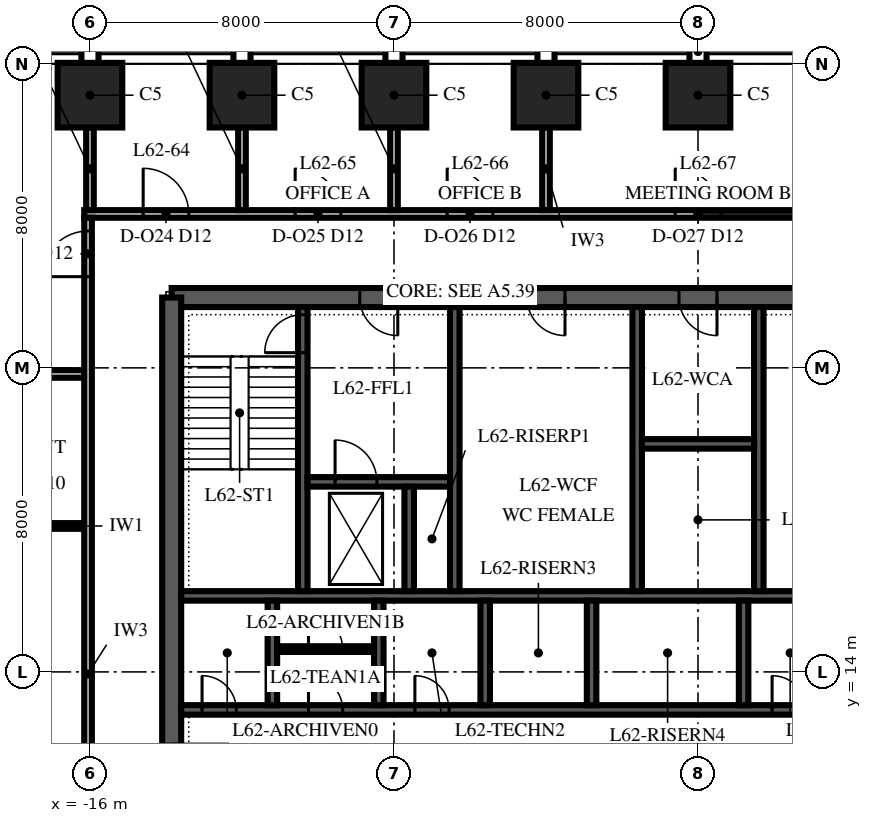
"""IFC4 building model, lengths in metres.
Left out: names, types, materials, properties, quantities, classifications, styles, units other than length and angle.
Written with IfcOpenShell. Run it as: python <this file> out.ifc"""

import sys

from ifc_helpers import new_model, si_unit, direction, frame, frame_2d, origin, origin_2d, place, context, subcontext, project, spatial, polyline, rectangle, outline, extrude, element, fill, save


model = new_model("IFC4")
c1 = context("Model", 3, precision=1e-05, world=origin(), true_north=direction((0.0, 1.0)))
c2 = subcontext(c1, "Body", "Model", "MODEL_VIEW")
j1 = project(units=[si_unit("LENGTHUNIT", "METRE"), si_unit("PLANEANGLEUNIT", "RADIAN")], contexts=[c1])
p1 = place(None, origin())
s1 = spatial("IfcSite", under=j1, at=p1, CompositionType="ELEMENT")
p2 = place(p1, origin())
s2 = spatial("IfcBuilding", under=s1, at=p2, CompositionType="ELEMENT")
p3 = place(p2, frame((0.0, 0.0, 268.0)))
s3 = spatial("IfcBuildingStorey", under=s2, at=p3, CompositionType="ELEMENT", Elevation=268.0)
for number, where, z_axis, x_axis in (
    (1, (0.0, 29.175, 0.0), (0.0, 0.0, 1.0), (-1.0, 0.0, 0.0)),
    (2, (-4.0, 29.175, 0.0), (0.0, 0.0, 1.0), (-1.0, 0.0, 0.0)),
    (3, (-8.0, 29.175, 0.0), (0.0, 0.0, 1.0), (-1.0, 0.0, 0.0)),
    (4, (-12.0, 29.175, 0.0), (0.0, 0.0, 1.0), (-1.0, 0.0, 0.0)),
    (5, (-16.0, 29.175, 0.0), (0.0, 0.0, 1.0), (-1.0, 0.0, 0.0)),
):
    element("IfcColumn", number, at=place(p3, frame(where, z_axis=z_axis, x_axis=x_axis)), inside=s3, PredefinedType="COLUMN", context=c2, shape_type="SweptSolid", body=[
        extrude(rectangle(XDim=1.7, YDim=1.7, at=origin_2d()), origin(), (0.0, 0.0, 1.0), 4.0),
    ])
p4 = place(p3, frame((13.85, 23.85, 0.0), z_axis=(0.0, 0.0, 1.0), x_axis=(-1.0, 0.0, 0.0)))
e6 = element("IfcWall", 6, at=p4, inside=s3, PredefinedType="SHEAR", context=c2, shape_type="SweptSolid", body=[
    extrude(rectangle(XDim=27.7, YDim=0.5, at=frame_2d((13.85, 0.0))), origin(), (0.0, 0.0, 1.0), 4.0),
])
p5 = place(p4, frame((21.75, 0.0, 0.0)))
e7 = element("IfcOpeningElement", 7, at=p5, cuts=e6, PredefinedType="OPENING", context=c2, shape_type="SweptSolid", body=[
    extrude(rectangle(XDim=1.0, YDim=2.1, at=frame_2d((0.5, 1.05))), frame((0.0, 0.265, 0.0), z_axis=(0.0, -1.0, 0.0), x_axis=(1.0, 0.0, 0.0)), (0.0, 0.0, 1.0), 0.53),
])
p6 = place(p4, frame((4.95, 0.0, 0.0)))
e8 = element("IfcOpeningElement", 8, at=p6, cuts=e6, PredefinedType="OPENING", context=c2, shape_type="SweptSolid", body=[
    extrude(rectangle(XDim=1.0, YDim=2.1, at=frame_2d((0.5, 1.05))), frame((0.0, 0.265, 0.0), z_axis=(0.0, -1.0, 0.0), x_axis=(1.0, 0.0, 0.0)), (0.0, 0.0, 1.0), 0.53),
])
p7 = place(p4, frame((17.35, 0.0, 0.0)))
e9 = element("IfcOpeningElement", 9, at=p7, cuts=e6, PredefinedType="OPENING", context=c2, shape_type="SweptSolid", body=[
    extrude(rectangle(XDim=1.0, YDim=2.1, at=frame_2d((0.5, 1.05))), frame((0.0, 0.265, 0.0), z_axis=(0.0, -1.0, 0.0), x_axis=(1.0, 0.0, 0.0)), (0.0, 0.0, 1.0), 0.53),
])
p8 = place(p4, frame((13.35, 0.0, 0.0)))
e10 = element("IfcOpeningElement", 10, at=p8, cuts=e6, PredefinedType="OPENING", context=c2, shape_type="SweptSolid", body=[
    extrude(rectangle(XDim=1.0, YDim=2.1, at=frame_2d((0.5, 1.05))), frame((0.0, 0.265, 0.0), z_axis=(0.0, -1.0, 0.0), x_axis=(1.0, 0.0, 0.0)), (0.0, 0.0, 1.0), 0.53),
])
p9 = place(p4, frame((9.35, 0.0, 0.0)))
e11 = element("IfcOpeningElement", 11, at=p9, cuts=e6, PredefinedType="OPENING", context=c2, shape_type="SweptSolid", body=[
    extrude(rectangle(XDim=1.0, YDim=2.1, at=frame_2d((0.5, 1.05))), frame((0.0, 0.265, 0.0), z_axis=(0.0, -1.0, 0.0), x_axis=(1.0, 0.0, 0.0)), (0.0, 0.0, 1.0), 0.53),
])
p10 = place(p3, frame((-13.85, 23.85, 0.0), z_axis=(0.0, 0.0, 1.0), x_axis=(0.0, -1.0, 0.0)))
e12 = element("IfcWall", 12, at=p10, inside=s3, PredefinedType="SHEAR", context=c2, shape_type="SweptSolid", body=[
    extrude(outline(polyline([(0.0, -0.25), (17.7, -0.25), (17.7, 0.0), (17.45, 0.0), (17.45, 0.25), (0.25, 0.25), (0.25, 0.0), (0.0, 0.0), (0.0, -0.25)])), origin(), (0.0, 0.0, 1.0), 4.0),
])
p11 = place(p10, frame((11.75, 0.0, 0.0)))
e13 = element("IfcOpeningElement", 13, at=p11, cuts=e12, PredefinedType="OPENING", context=c2, shape_type="SweptSolid", body=[
    extrude(rectangle(XDim=1.8, YDim=2.4, at=frame_2d((0.9, 1.2))), frame((0.0, 0.265, 0.0), z_axis=(0.0, -1.0, 0.0), x_axis=(1.0, 0.0, 0.0)), (0.0, 0.0, 1.0), 0.53),
])
p12 = place(p3, frame((-13.6, 13.0, 0.0), z_axis=(0.0, 0.0, 1.0), x_axis=(1.0, 0.0, 0.0)))
e14 = element("IfcWall", 14, at=p12, inside=s3, PredefinedType="SHEAR", context=c2, shape_type="SweptSolid", body=[
    extrude(rectangle(XDim=27.2, YDim=0.25, at=frame_2d((13.6, 0.0))), origin(), (0.0, 0.0, 1.0), 4.0),
])
p13 = place(p12, frame((15.55, 0.0, 0.0)))
e15 = element("IfcOpeningElement", 15, at=p13, cuts=e14, PredefinedType="OPENING", context=c2, shape_type="SweptSolid", body=[
    extrude(rectangle(XDim=0.9, YDim=2.1, at=frame_2d((0.45, 1.05))), frame((0.0, 0.14, 0.0), z_axis=(0.0, -1.0, 0.0), x_axis=(1.0, 0.0, 0.0)), (0.0, 0.0, 1.0), 0.28),
])
p14 = place(p12, frame((17.95, 0.0, 0.0)))
e16 = element("IfcOpeningElement", 16, at=p14, cuts=e14, PredefinedType="OPENING", context=c2, shape_type="SweptSolid", body=[
    extrude(rectangle(XDim=0.9, YDim=2.1, at=frame_2d((0.45, 1.05))), frame((0.0, 0.14, 0.0), z_axis=(0.0, -1.0, 0.0), x_axis=(1.0, 0.0, 0.0)), (0.0, 0.0, 1.0), 0.28),
])
p15 = place(p12, frame((21.15, 0.0, 0.0)))
e17 = element("IfcOpeningElement", 17, at=p15, cuts=e14, PredefinedType="OPENING", context=c2, shape_type="SweptSolid", body=[
    extrude(rectangle(XDim=0.9, YDim=2.1, at=frame_2d((0.45, 1.05))), frame((0.0, 0.14, 0.0), z_axis=(0.0, -1.0, 0.0), x_axis=(1.0, 0.0, 0.0)), (0.0, 0.0, 1.0), 0.28),
])
p16 = place(p12, frame((0.55, 0.0, 0.0)))
e18 = element("IfcOpeningElement", 18, at=p16, cuts=e14, PredefinedType="OPENING", context=c2, shape_type="SweptSolid", body=[
    extrude(rectangle(XDim=0.9, YDim=2.1, at=frame_2d((0.45, 1.05))), frame((0.0, 0.14, 0.0), z_axis=(0.0, -1.0, 0.0), x_axis=(1.0, 0.0, 0.0)), (0.0, 0.0, 1.0), 0.28),
])
p17 = place(p12, frame((3.35, 0.0, 0.0)))
e19 = element("IfcOpeningElement", 19, at=p17, cuts=e14, PredefinedType="OPENING", context=c2, shape_type="SweptSolid", body=[
    extrude(rectangle(XDim=0.9, YDim=2.1, at=frame_2d((0.45, 1.05))), frame((0.0, 0.14, 0.0), z_axis=(0.0, -1.0, 0.0), x_axis=(1.0, 0.0, 0.0)), (0.0, 0.0, 1.0), 0.28),
])
p18 = place(p12, frame((6.15, 0.0, 0.0)))
e20 = element("IfcOpeningElement", 20, at=p18, cuts=e14, PredefinedType="OPENING", context=c2, shape_type="SweptSolid", body=[
    extrude(rectangle(XDim=0.9, YDim=2.1, at=frame_2d((0.45, 1.05))), frame((0.0, 0.14, 0.0), z_axis=(0.0, -1.0, 0.0), x_axis=(1.0, 0.0, 0.0)), (0.0, 0.0, 1.0), 0.28),
])
p19 = place(p3, frame((-13.6, 16.0, 0.0), z_axis=(0.0, 0.0, 1.0), x_axis=(1.0, 0.0, 0.0)))
e21 = element("IfcWall", 21, at=p19, inside=s3, PredefinedType="SHEAR", context=c2, shape_type="SweptSolid", body=[
    extrude(rectangle(XDim=27.2, YDim=0.25, at=frame_2d((13.6, 0.0))), origin(), (0.0, 0.0, 1.0), 4.0),
])
for number, where, z_axis, x_axis in (
    (22, (-11.2, 13.125, 0.0), (0.0, 0.0, 1.0), (0.0, 1.0, 0.0)),
    (23, (-8.4, 13.125, 0.0), (0.0, 0.0, 1.0), (0.0, 1.0, 0.0)),
    (24, (-5.6, 13.125, 0.0), (0.0, 0.0, 1.0), (0.0, 1.0, 0.0)),
    (25, (-2.8, 13.125, 0.0), (0.0, 0.0, 1.0), (0.0, 1.0, 0.0)),
    (26, (1.2, 13.125, 0.0), (0.0, 0.0, 1.0), (0.0, 1.0, 0.0)),
):
    element("IfcWall", number, at=place(p3, frame(where, z_axis=z_axis, x_axis=x_axis)), inside=s3, PredefinedType="SHEAR", context=c2, shape_type="SweptSolid", body=[
        extrude(rectangle(XDim=2.75, YDim=0.25, at=frame_2d((1.375, 0.0))), origin(), (0.0, 0.0, 1.0), 4.0),
    ])
p20 = place(p3, frame((-10.4, 16.125, 0.0), z_axis=(0.0, 0.0, 1.0), x_axis=(0.0, 1.0, 0.0)))
e27 = element("IfcWall", 27, at=p20, inside=s3, PredefinedType="SHEAR", context=c2, shape_type="SweptSolid", body=[
    extrude(rectangle(XDim=7.475, YDim=0.25, at=frame_2d((3.738, 0.0))), origin(), (0.0, 0.0, 1.0), 4.0),
])
p21 = place(p20, frame((6.275, 0.0, 0.0)))
e28 = element("IfcOpeningElement", 28, at=p21, cuts=e27, PredefinedType="OPENING", context=c2, shape_type="SweptSolid", body=[
    extrude(rectangle(XDim=1.0, YDim=2.1, at=frame_2d((0.5, 1.05))), frame((0.0, 0.14, 0.0), z_axis=(0.0, -1.0, 0.0), x_axis=(1.0, 0.0, 0.0)), (0.0, 0.0, 1.0), 0.28),
])
for number, where, z_axis, x_axis in (
    (29, (-6.4, 16.125, 0.0), (0.0, 0.0, 1.0), (0.0, 1.0, 0.0)),
    (30, (-1.6, 16.125, 0.0), (0.0, 0.0, 1.0), (0.0, 1.0, 0.0)),
    (31, (1.6, 16.125, 0.0), (0.0, 0.0, 1.0), (0.0, 1.0, 0.0)),
):
    element("IfcWall", number, at=place(p3, frame(where, z_axis=z_axis, x_axis=x_axis)), inside=s3, PredefinedType="SHEAR", context=c2, shape_type="SweptSolid", body=[
        extrude(rectangle(XDim=7.475, YDim=0.25, at=frame_2d((3.738, 0.0))), origin(), (0.0, 0.0, 1.0), 4.0),
    ])
p22 = place(p3, frame((-10.275, 19.0, 0.0), z_axis=(0.0, 0.0, 1.0), x_axis=(1.0, 0.0, 0.0)))
e32 = element("IfcWall", 32, at=p22, inside=s3, PredefinedType="SHEAR", context=c2, shape_type="SweptSolid", body=[
    extrude(rectangle(XDim=3.75, YDim=0.25, at=frame_2d((1.875, 0.0))), origin(), (0.0, 0.0, 1.0), 4.0),
])
p23 = place(p22, frame((0.725, 0.0, 0.0)))
e33 = element("IfcOpeningElement", 33, at=p23, cuts=e32, PredefinedType="OPENING", context=c2, shape_type="SweptSolid", body=[
    extrude(rectangle(XDim=1.1, YDim=2.1, at=frame_2d((0.55, 1.05))), frame((0.0, 0.14, 0.0), z_axis=(0.0, -1.0, 0.0), x_axis=(1.0, 0.0, 0.0)), (0.0, 0.0, 1.0), 0.28),
])
p24 = place(p3, frame((-7.6, 16.125, 0.0), z_axis=(0.0, 0.0, 1.0), x_axis=(0.0, 1.0, 0.0)))
e34 = element("IfcWall", 34, at=p24, inside=s3, PredefinedType="SHEAR", context=c2, shape_type="SweptSolid", body=[
    extrude(rectangle(XDim=2.75, YDim=0.25, at=frame_2d((1.375, 0.0))), origin(), (0.0, 0.0, 1.0), 4.0),
])
p25 = place(p3, frame((-1.475, 20.0, 0.0), z_axis=(0.0, 0.0, 1.0), x_axis=(1.0, 0.0, 0.0)))
e35 = element("IfcWall", 35, at=p25, inside=s3, PredefinedType="SHEAR", context=c2, shape_type="SweptSolid", body=[
    extrude(rectangle(XDim=2.95, YDim=0.25, at=frame_2d((1.475, 0.0))), origin(), (0.0, 0.0, 1.0), 4.0),
])
p26 = place(p3, frame((-11.075, 14.6, 0.0), z_axis=(0.0, 0.0, 1.0), x_axis=(1.0, 0.0, 0.0)))
e36 = element("IfcWall", 36, at=p26, inside=s3, PredefinedType="PARTITIONING", context=c2, shape_type="SweptSolid", body=[
    extrude(rectangle(XDim=2.55, YDim=0.15, at=frame_2d((1.275, 0.0))), origin(), (0.0, 0.0, 1.0), 3.85),
])
p27 = place(p26, frame((0.825, 0.0, 0.0)))
e37 = element("IfcOpeningElement", 37, at=p27, cuts=e36, PredefinedType="OPENING", context=c2, shape_type="SweptSolid", body=[
    extrude(rectangle(XDim=0.9, YDim=2.1, at=frame_2d((0.45, 1.05))), frame((0.0, 0.09, 0.0), z_axis=(0.0, -1.0, 0.0), x_axis=(1.0, 0.0, 0.0)), (0.0, 0.0, 1.0), 0.18),
])
p28 = place(p3, frame((-19.725, 17.84, 0.0), z_axis=(0.0, 0.0, 1.0), x_axis=(1.0, 0.0, 0.0)))
e38 = element("IfcWall", 38, at=p28, inside=s3, PredefinedType="PARTITIONING", context=c2, shape_type="SweptSolid", body=[
    extrude(rectangle(XDim=3.575, YDim=0.15, at=frame_2d((1.788, 0.0))), origin(), (0.0, 0.0, 1.0), 3.23),
])
p29 = place(p28, frame((1.375, 0.0, 0.0)))
e39 = element("IfcOpeningElement", 39, at=p29, cuts=e38, PredefinedType="OPENING", context=c2, shape_type="SweptSolid", body=[
    extrude(rectangle(XDim=1.0, YDim=2.3, at=frame_2d((0.5, 1.15))), frame((0.0, 0.09, 0.0), z_axis=(0.0, -1.0, 0.0), x_axis=(1.0, 0.0, 0.0)), (0.0, 0.0, 1.0), 0.18),
])
p30 = place(p3, frame((-23.324, 21.84, 0.0), z_axis=(0.0, 0.0, 1.0), x_axis=(1.0, 0.0, 0.0)))
e40 = element("IfcWall", 40, at=p30, inside=s3, PredefinedType="PARTITIONING", context=c2, shape_type="SweptSolid", body=[
    extrude(rectangle(XDim=7.174, YDim=0.2, at=frame_2d((3.587, 0.0))), origin(), (0.0, 0.0, 1.0), 3.23),
])
p31 = place(p3, frame((-16.15, 26.05, 0.0), z_axis=(0.0, 0.0, 1.0), x_axis=(1.0, 0.0, 0.0)))
e41 = element("IfcWall", 41, at=p31, inside=s3, PredefinedType="PARTITIONING", context=c2, shape_type="SweptSolid", body=[
    extrude(rectangle(XDim=32.3, YDim=0.2, at=frame_2d((16.15, 0.0))), origin(), (0.0, 0.0, 1.0), 3.418),
])
p32 = place(p31, frame((1.55, 0.0, 0.0)))
e42 = element("IfcOpeningElement", 42, at=p32, cuts=e41, PredefinedType="OPENING", context=c2, shape_type="SweptSolid", body=[
    extrude(rectangle(XDim=1.2, YDim=2.4, at=frame_2d((0.6, 1.2))), frame((0.0, 0.115, 0.0), z_axis=(0.0, -1.0, 0.0), x_axis=(1.0, 0.0, 0.0)), (0.0, 0.0, 1.0), 0.23),
])
p33 = place(p31, frame((5.55, 0.0, 0.0)))
e43 = element("IfcOpeningElement", 43, at=p33, cuts=e41, PredefinedType="OPENING", context=c2, shape_type="SweptSolid", body=[
    extrude(rectangle(XDim=1.2, YDim=2.4, at=frame_2d((0.6, 1.2))), frame((0.0, 0.115, 0.0), z_axis=(0.0, -1.0, 0.0), x_axis=(1.0, 0.0, 0.0)), (0.0, 0.0, 1.0), 0.23),
])
p34 = place(p31, frame((9.55, 0.0, 0.0)))
e44 = element("IfcOpeningElement", 44, at=p34, cuts=e41, PredefinedType="OPENING", context=c2, shape_type="SweptSolid", body=[
    extrude(rectangle(XDim=1.2, YDim=2.4, at=frame_2d((0.6, 1.2))), frame((0.0, 0.115, 0.0), z_axis=(0.0, -1.0, 0.0), x_axis=(1.0, 0.0, 0.0)), (0.0, 0.0, 1.0), 0.23),
])
p35 = place(p31, frame((15.55, 0.0, 0.0)))
e45 = element("IfcOpeningElement", 45, at=p35, cuts=e41, PredefinedType="OPENING", context=c2, shape_type="SweptSolid", body=[
    extrude(rectangle(XDim=1.2, YDim=2.4, at=frame_2d((0.6, 1.2))), frame((0.0, 0.115, 0.0), z_axis=(0.0, -1.0, 0.0), x_axis=(1.0, 0.0, 0.0)), (0.0, 0.0, 1.0), 0.23),
])
p36 = place(p31, frame((21.55, 0.0, 0.0)))
e46 = element("IfcOpeningElement", 46, at=p36, cuts=e41, PredefinedType="OPENING", context=c2, shape_type="SweptSolid", body=[
    extrude(rectangle(XDim=1.2, YDim=2.4, at=frame_2d((0.6, 1.2))), frame((0.0, 0.115, 0.0), z_axis=(0.0, -1.0, 0.0), x_axis=(1.0, 0.0, 0.0)), (0.0, 0.0, 1.0), 0.23),
])
p37 = place(p31, frame((25.55, 0.0, 0.0)))
e47 = element("IfcOpeningElement", 47, at=p37, cuts=e41, PredefinedType="OPENING", context=c2, shape_type="SweptSolid", body=[
    extrude(rectangle(XDim=1.2, YDim=2.4, at=frame_2d((0.6, 1.2))), frame((0.0, 0.115, 0.0), z_axis=(0.0, -1.0, 0.0), x_axis=(1.0, 0.0, 0.0)), (0.0, 0.0, 1.0), 0.23),
])
p38 = place(p31, frame((29.55, 0.0, 0.0)))
e48 = element("IfcOpeningElement", 48, at=p38, cuts=e41, PredefinedType="OPENING", context=c2, shape_type="SweptSolid", body=[
    extrude(rectangle(XDim=1.2, YDim=2.4, at=frame_2d((0.6, 1.2))), frame((0.0, 0.115, 0.0), z_axis=(0.0, -1.0, 0.0), x_axis=(1.0, 0.0, 0.0)), (0.0, 0.0, 1.0), 0.23),
])
p39 = place(p3, frame((-16.05, 1.94, 0.0), z_axis=(0.0, 0.0, 1.0), x_axis=(0.0, 1.0, 0.0)))
e49 = element("IfcWall", 49, at=p39, inside=s3, PredefinedType="PARTITIONING", context=c2, shape_type="SweptSolid", body=[
    extrude(rectangle(XDim=24.01, YDim=0.2, at=frame_2d((12.005, 0.0))), origin(), (0.0, 0.0, 1.0), 2.842),
])
p40 = place(p39, frame((22.46, 0.0, 0.0)))
e50 = element("IfcOpeningElement", 50, at=p40, cuts=e49, PredefinedType="OPENING", context=c2, shape_type="SweptSolid", body=[
    extrude(rectangle(XDim=1.2, YDim=2.4, at=frame_2d((0.6, 1.2))), frame((0.0, 0.115, 0.0), z_axis=(0.0, -1.0, 0.0), x_axis=(1.0, 0.0, 0.0)), (0.0, 0.0, 1.0), 0.23),
])
p41 = place(p39, frame((6.46, 0.0, 0.0)))
e51 = element("IfcOpeningElement", 51, at=p41, cuts=e49, PredefinedType="OPENING", context=c2, shape_type="SweptSolid", body=[
    extrude(rectangle(XDim=1.2, YDim=2.4, at=frame_2d((0.6, 1.2))), frame((0.0, 0.115, 0.0), z_axis=(0.0, -1.0, 0.0), x_axis=(1.0, 0.0, 0.0)), (0.0, 0.0, 1.0), 0.23),
])
for number, where, z_axis, x_axis in (
    (52, (-16.0, 26.15, 0.0), (0.0, 0.0, 1.0), (0.0, 1.0, 0.0)),
    (53, (-12.0, 26.15, 0.0), (0.0, 0.0, 1.0), (0.0, 1.0, 0.0)),
    (54, (-8.0, 26.15, 0.0), (0.0, 0.0, 1.0), (0.0, 1.0, 0.0)),
    (55, (-4.0, 26.15, 0.0), (0.0, 0.0, 1.0), (0.0, 1.0, 0.0)),
):
    element("IfcWall", number, at=place(p3, frame(where, z_axis=z_axis, x_axis=x_axis)), inside=s3, PredefinedType="PARTITIONING", context=c2, shape_type="SweptSolid", body=[
        extrude(rectangle(XDim=2.175, YDim=0.2, at=frame_2d((1.087, 0.0))), origin(), (0.0, 0.0, 1.0), 3.418),
    ])
p42 = place(p5, origin())
e56 = element("IfcDoor", 56, at=p42, inside=s3, OperationType="SINGLE_SWING_RIGHT", PredefinedType="DOOR", context=c2, shape_type="SweptSolid", body=[
    extrude(rectangle(XDim=1.0, YDim=2.1, at=frame_2d((0.5, 1.05))), frame((0.0, 0.25, 0.0), z_axis=(0.0, -1.0, 0.0), x_axis=(1.0, 0.0, 0.0)), (0.0, 0.0, 1.0), 0.5),
])
fill(e7, e56)
p43 = place(p7, origin())
e57 = element("IfcDoor", 57, at=p43, inside=s3, OperationType="SINGLE_SWING_LEFT", PredefinedType="DOOR", context=c2, shape_type="SweptSolid", body=[
    extrude(rectangle(XDim=1.0, YDim=2.1, at=frame_2d((0.5, 1.05))), frame((0.0, 0.25, 0.0), z_axis=(0.0, -1.0, 0.0), x_axis=(1.0, 0.0, 0.0)), (0.0, 0.0, 1.0), 0.5),
])
fill(e9, e57)
p44 = place(p8, origin())
e58 = element("IfcDoor", 58, at=p44, inside=s3, OperationType="SINGLE_SWING_LEFT", PredefinedType="DOOR", context=c2, shape_type="SweptSolid", body=[
    extrude(rectangle(XDim=1.0, YDim=2.1, at=frame_2d((0.5, 1.05))), frame((0.0, 0.25, 0.0), z_axis=(0.0, -1.0, 0.0), x_axis=(1.0, 0.0, 0.0)), (0.0, 0.0, 1.0), 0.5),
])
fill(e10, e58)
p45 = place(p21, origin())
e59 = element("IfcDoor", 59, at=p45, inside=s3, OperationType="SINGLE_SWING_LEFT", PredefinedType="DOOR", context=c2, shape_type="SweptSolid", body=[
    extrude(rectangle(XDim=1.0, YDim=2.1, at=frame_2d((0.5, 1.05))), frame((0.0, 0.125, 0.0), z_axis=(0.0, -1.0, 0.0), x_axis=(1.0, 0.0, 0.0)), (0.0, 0.0, 1.0), 0.25),
])
fill(e28, e59)
p46 = place(p23, origin())
e60 = element("IfcDoor", 60, at=p46, inside=s3, OperationType="SLIDING_TO_RIGHT", PredefinedType="DOOR", context=c2, shape_type="SweptSolid", body=[
    extrude(rectangle(XDim=1.1, YDim=2.1, at=frame_2d((0.55, 1.05))), frame((0.0, 0.125, 0.0), z_axis=(0.0, -1.0, 0.0), x_axis=(1.0, 0.0, 0.0)), (0.0, 0.0, 1.0), 0.25),
])
fill(e33, e60)
p47 = place(p13, origin())
e61 = element("IfcDoor", 61, at=p47, inside=s3, OperationType="SINGLE_SWING_LEFT", PredefinedType="DOOR", context=c2, shape_type="SweptSolid", body=[
    extrude(rectangle(XDim=0.9, YDim=2.1, at=frame_2d((0.45, 1.05))), frame((0.0, 0.125, 0.0), z_axis=(0.0, -1.0, 0.0), x_axis=(1.0, 0.0, 0.0)), (0.0, 0.0, 1.0), 0.25),
])
fill(e15, e61)
p48 = place(p16, origin())
e62 = element("IfcDoor", 62, at=p48, inside=s3, OperationType="SINGLE_SWING_LEFT", PredefinedType="DOOR", context=c2, shape_type="SweptSolid", body=[
    extrude(rectangle(XDim=0.9, YDim=2.1, at=frame_2d((0.45, 1.05))), frame((0.0, 0.125, 0.0), z_axis=(0.0, -1.0, 0.0), x_axis=(1.0, 0.0, 0.0)), (0.0, 0.0, 1.0), 0.25),
])
fill(e18, e62)
p49 = place(p17, origin())
e63 = element("IfcDoor", 63, at=p49, inside=s3, OperationType="SINGLE_SWING_LEFT", PredefinedType="DOOR", context=c2, shape_type="SweptSolid", body=[
    extrude(rectangle(XDim=0.9, YDim=2.1, at=frame_2d((0.45, 1.05))), frame((0.0, 0.125, 0.0), z_axis=(0.0, -1.0, 0.0), x_axis=(1.0, 0.0, 0.0)), (0.0, 0.0, 1.0), 0.25),
])
fill(e19, e63)
p50 = place(p27, origin())
e64 = element("IfcDoor", 64, at=p50, inside=s3, OperationType="SINGLE_SWING_LEFT", PredefinedType="DOOR", context=c2, shape_type="SweptSolid", body=[
    extrude(rectangle(XDim=0.9, YDim=2.1, at=frame_2d((0.45, 1.05))), frame((0.0, 0.075, 0.0), z_axis=(0.0, -1.0, 0.0), x_axis=(1.0, 0.0, 0.0)), (0.0, 0.0, 1.0), 0.149),
])
fill(e37, e64)
p51 = place(p18, origin())
e65 = element("IfcDoor", 65, at=p51, inside=s3, OperationType="SINGLE_SWING_LEFT", PredefinedType="DOOR", context=c2, shape_type="SweptSolid", body=[
    extrude(rectangle(XDim=0.9, YDim=2.1, at=frame_2d((0.45, 1.05))), frame((0.0, 0.125, 0.0), z_axis=(0.0, -1.0, 0.0), x_axis=(1.0, 0.0, 0.0)), (0.0, 0.0, 1.0), 0.25),
])
fill(e20, e65)
p52 = place(p32, origin())
e66 = element("IfcDoor", 66, at=p52, inside=s3, OperationType="SINGLE_SWING_LEFT", PredefinedType="DOOR", context=c2, shape_type="SweptSolid", body=[
    extrude(rectangle(XDim=1.2, YDim=2.4, at=frame_2d((0.6, 1.2))), frame((0.0, 0.1, 0.0), z_axis=(0.0, -1.0, 0.0), x_axis=(1.0, 0.0, 0.0)), (0.0, 0.0, 1.0), 0.199),
])
fill(e42, e66)
p53 = place(p33, origin())
e67 = element("IfcDoor", 67, at=p53, inside=s3, OperationType="SINGLE_SWING_LEFT", PredefinedType="DOOR", context=c2, shape_type="SweptSolid", body=[
    extrude(rectangle(XDim=1.2, YDim=2.4, at=frame_2d((0.6, 1.2))), frame((0.0, 0.1, 0.0), z_axis=(0.0, -1.0, 0.0), x_axis=(1.0, 0.0, 0.0)), (0.0, 0.0, 1.0), 0.199),
])
fill(e43, e67)
p54 = place(p34, origin())
e68 = element("IfcDoor", 68, at=p54, inside=s3, OperationType="SINGLE_SWING_LEFT", PredefinedType="DOOR", context=c2, shape_type="SweptSolid", body=[
    extrude(rectangle(XDim=1.2, YDim=2.4, at=frame_2d((0.6, 1.2))), frame((0.0, 0.1, 0.0), z_axis=(0.0, -1.0, 0.0), x_axis=(1.0, 0.0, 0.0)), (0.0, 0.0, 1.0), 0.199),
])
fill(e44, e68)
p55 = place(p35, origin())
e69 = element("IfcDoor", 69, at=p55, inside=s3, OperationType="SINGLE_SWING_LEFT", PredefinedType="DOOR", context=c2, shape_type="SweptSolid", body=[
    extrude(rectangle(XDim=1.2, YDim=2.4, at=frame_2d((0.6, 1.2))), frame((0.0, 0.1, 0.0), z_axis=(0.0, -1.0, 0.0), x_axis=(1.0, 0.0, 0.0)), (0.0, 0.0, 1.0), 0.199),
])
fill(e45, e69)
p56 = place(p40, origin())
e70 = element("IfcDoor", 70, at=p56, inside=s3, OperationType="SINGLE_SWING_LEFT", PredefinedType="DOOR", context=c2, shape_type="SweptSolid", body=[
    extrude(rectangle(XDim=1.2, YDim=2.4, at=frame_2d((0.6, 1.2))), frame((0.0, 0.1, 0.0), z_axis=(0.0, -1.0, 0.0), x_axis=(1.0, 0.0, 0.0)), (0.0, 0.0, 1.0), 0.199),
])
fill(e50, e70)
save(model, sys.argv[1])
